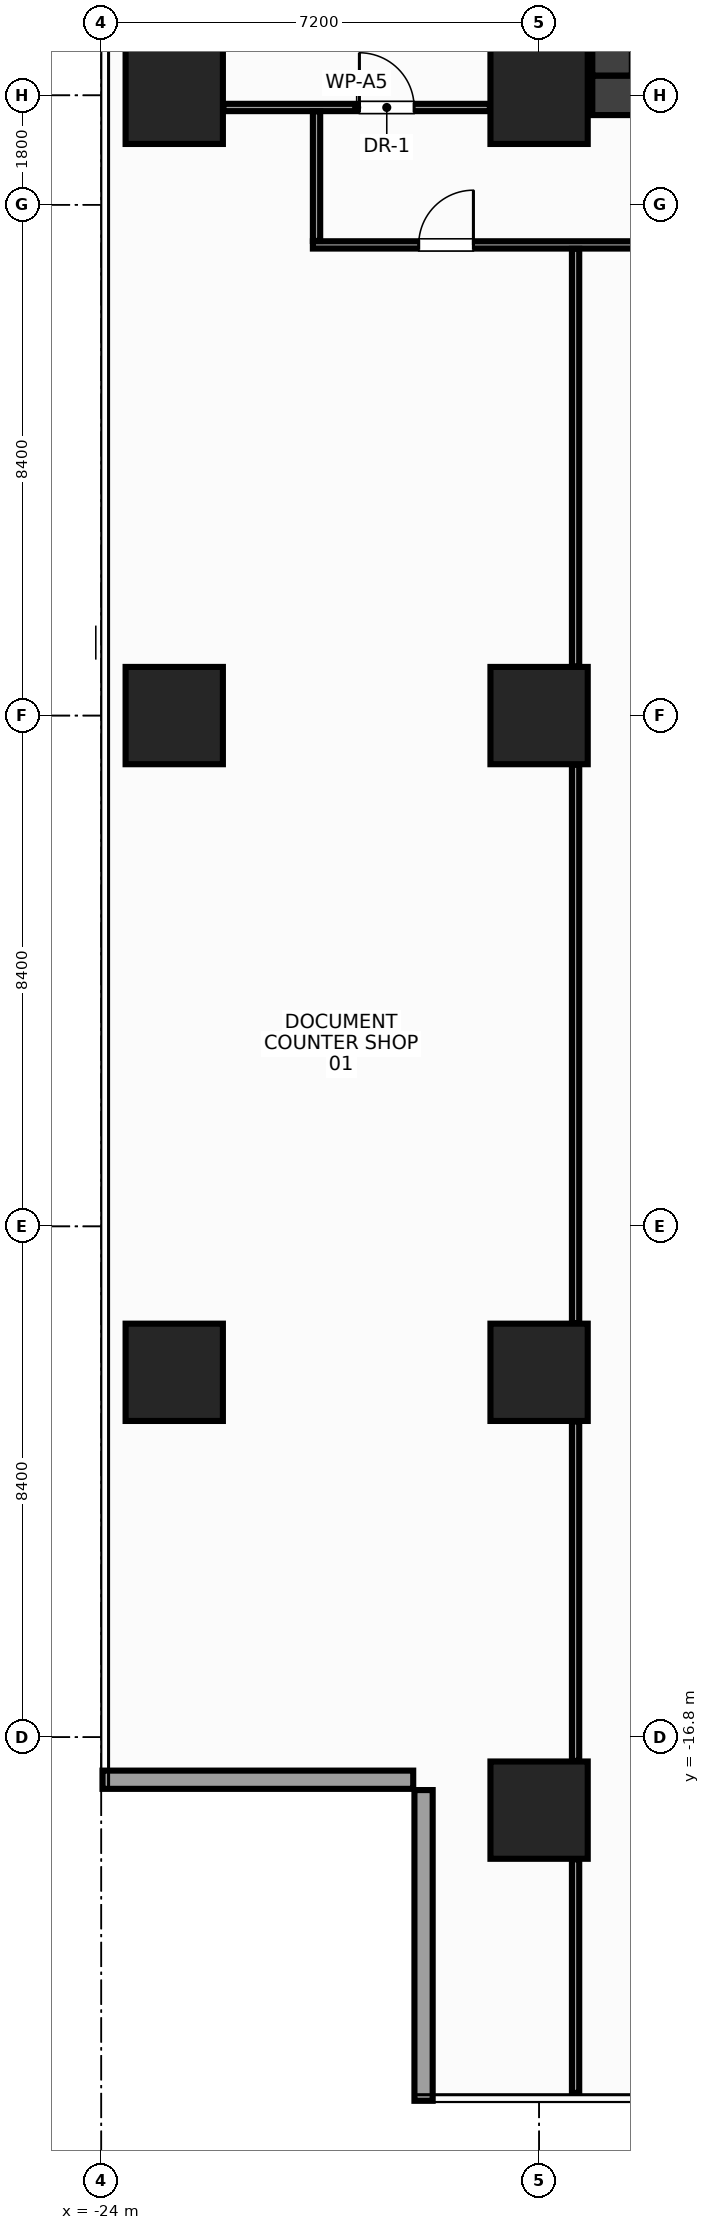
"""IFC4 building model, lengths in metres.
Left out: names, types, materials, properties, quantities, classifications, styles, units other than length and angle.
Written with IfcOpenShell. Run it as: python <this file> out.ifc"""

import sys

from ifc_helpers import new_model, si_unit, direction, frame, frame_2d, origin, origin_2d, place, context, subcontext, project, spatial, rectangle, extrude, source, transform, mapped, element, fill, save


model = new_model("IFC4")
c1 = context("Model", 3, precision=1e-05, world=origin(), true_north=direction((0.0, 1.0)))
c2 = subcontext(c1, "Body", "Model", "MODEL_VIEW")
j1 = project(units=[si_unit("LENGTHUNIT", "METRE"), si_unit("PLANEANGLEUNIT", "RADIAN")], contexts=[c1])
p1 = place(None, origin())
s1 = spatial("IfcSite", under=j1, at=p1, CompositionType="ELEMENT")
p2 = place(p1, origin())
s2 = spatial("IfcBuilding", under=s1, at=p2, CompositionType="ELEMENT")
p3 = place(p2, frame((0.0, 0.0, 142.4)))
s3 = spatial("IfcBuildingStorey", under=s2, at=p3, CompositionType="ELEMENT", Elevation=142.4)
m1 = source(origin(), c2, "Body", "SweptSolid", [
    extrude(rectangle(XDim=31.85, YDim=0.65, at=frame_2d((15.925, 0.0))), origin(), (0.0, 0.0, 1.0), 3.6),
])
p4 = place(p3, frame((-15.925, 10.2, 0.0), z_axis=(0.0, 0.0, 1.0), x_axis=(1.0, 0.0, 0.0)))
e1 = element("IfcWall", 1, at=p4, inside=s3, PredefinedType="SHEAR", context=c2, shape_type="MappedRepresentation", body=[
    mapped(m1, transform((0.0, 0.0, 0.0), x_axis=(1.0, 0.0, 0.0), y_axis=(0.0, 1.0, 0.0), z_axis=(0.0, 0.0, 1.0), scale=1.0)),
])
p5 = place(p4, frame((1.775, 0.0, 0.0)))
e2 = element("IfcOpeningElement", 2, at=p5, cuts=e1, PredefinedType="OPENING", context=c2, shape_type="SweptSolid", body=[
    extrude(rectangle(XDim=1.6, YDim=2.15, at=frame_2d((0.8, 1.075))), frame((0.0, 0.337, 0.0), z_axis=(0.0, -1.0, 0.0), x_axis=(1.0, 0.0, 0.0)), (0.0, 0.0, 1.0), 0.674),
])
p6 = place(p4, frame((28.475, 0.0, 0.0)))
e3 = element("IfcOpeningElement", 3, at=p6, cuts=e1, PredefinedType="OPENING", context=c2, shape_type="SweptSolid", body=[
    extrude(rectangle(XDim=1.6, YDim=2.15, at=frame_2d((0.8, 1.075))), frame((0.0, 0.337, 0.0), z_axis=(0.0, -1.0, 0.0), x_axis=(1.0, 0.0, 0.0)), (0.0, 0.0, 1.0), 0.674),
])
p7 = place(p4, frame((15.175, 0.0, 0.0)))
e4 = element("IfcOpeningElement", 4, at=p7, cuts=e1, PredefinedType="OPENING", context=c2, shape_type="SweptSolid", body=[
    extrude(rectangle(XDim=1.5, YDim=2.2, at=frame_2d((0.75, 1.1))), frame((0.0, 0.337, 0.0), z_axis=(0.0, -1.0, 0.0), x_axis=(1.0, 0.0, 0.0)), (0.0, 0.0, 1.0), 0.674),
])
m2 = source(origin(), c2, "Body", "SweptSolid", [
    extrude(rectangle(XDim=12.95, YDim=0.65, at=frame_2d((6.475, 0.0))), origin(), (0.0, 0.0, 1.0), 3.6),
])
p8 = place(p3, frame((-15.6, 10.525, 0.0), z_axis=(0.0, 0.0, 1.0), x_axis=(0.0, 1.0, 0.0)))
e5 = element("IfcWall", 5, at=p8, inside=s3, PredefinedType="SHEAR", context=c2, shape_type="MappedRepresentation", body=[
    mapped(m2, transform((0.0, 0.0, 0.0), x_axis=(1.0, 0.0, 0.0), y_axis=(0.0, 1.0, 0.0), z_axis=(0.0, 0.0, 1.0), scale=1.0)),
])
m3 = source(origin(), c2, "Body", "SweptSolid", [
    extrude(rectangle(XDim=1.6, YDim=1.6, at=origin_2d()), origin(), (0.0, 0.0, 1.0), 3.6),
])
for number, where, z_axis, x_axis in (
    (6, (-16.8, -18.0, 0.0), (0.0, 0.0, 1.0), (1.0, 0.0, 0.0)),
    (7, (-16.8, -10.8, 0.0), (0.0, 0.0, 1.0), (1.0, 0.0, 0.0)),
    (8, (-16.8, 0.0, 0.0), (0.0, 0.0, 1.0), (1.0, 0.0, 0.0)),
    (9, (-16.8, 10.2, 0.0), (0.0, 0.0, 1.0), (1.0, 0.0, 0.0)),
    (10, (-22.8, -10.8, 0.0), (0.0, 0.0, 1.0), (1.0, 0.0, 0.0)),
    (11, (-22.8, 0.0, 0.0), (0.0, 0.0, 1.0), (1.0, 0.0, 0.0)),
    (12, (-22.8, 10.2, 0.0), (0.0, 0.0, 1.0), (1.0, 0.0, 0.0)),
):
    element("IfcColumn", number, at=place(p3, frame(where, z_axis=z_axis, x_axis=x_axis)), inside=s3, PredefinedType="COLUMN", context=c2, shape_type="MappedRepresentation", body=[
        mapped(m3, transform((0.0, 0.0, 0.0), x_axis=(1.0, 0.0, 0.0), y_axis=(0.0, 1.0, 0.0), z_axis=(0.0, 0.0, 1.0), scale=1.0)),
    ])
m4 = source(origin(), c2, "Body", "SweptSolid", [
    extrude(rectangle(XDim=5.11, YDim=0.3, at=frame_2d((2.555, 0.0))), origin(), (0.0, 0.0, 1.0), 2.76),
])
p9 = place(p3, frame((-23.98, -17.5, 0.0), z_axis=(0.0, 0.0, 1.0), x_axis=(1.0, 0.0, 0.0)))
e13 = element("IfcWall", 13, at=p9, inside=s3, PredefinedType="STANDARD", context=c2, shape_type="MappedRepresentation", body=[
    mapped(m4, transform((0.0, 0.0, 0.0), x_axis=(1.0, 0.0, 0.0), y_axis=(0.0, 1.0, 0.0), z_axis=(0.0, 0.0, 1.0), scale=1.0)),
])
m5 = source(origin(), c2, "Body", "SweptSolid", [
    extrude(rectangle(XDim=5.11, YDim=0.3, at=frame_2d((2.555, 0.0))), origin(), (0.0, 0.0, 1.0), 2.76),
])
p10 = place(p3, frame((-18.7, -17.67, 0.0), z_axis=(0.0, 0.0, 1.0), x_axis=(0.0, -1.0, 0.0)))
e14 = element("IfcWall", 14, at=p10, inside=s3, PredefinedType="STANDARD", context=c2, shape_type="MappedRepresentation", body=[
    mapped(m5, transform((0.0, 0.0, 0.0), x_axis=(1.0, 0.0, 0.0), y_axis=(0.0, 1.0, 0.0), z_axis=(0.0, 0.0, 1.0), scale=1.0)),
])
m6 = source(origin(), c2, "Body", "SweptSolid", [
    extrude(rectangle(XDim=4.38, YDim=0.12, at=frame_2d((2.19, 0.0))), origin(), (0.0, 0.0, 1.0), 2.915),
])
p11 = place(p3, frame((-21.99, 10.0, 0.0), z_axis=(0.0, 0.0, 1.0), x_axis=(1.0, 0.0, 0.0)))
e15 = element("IfcWall", 15, at=p11, inside=s3, PredefinedType="PARTITIONING", context=c2, shape_type="MappedRepresentation", body=[
    mapped(m6, transform((0.0, 0.0, 0.0), x_axis=(1.0, 0.0, 0.0), y_axis=(0.0, 1.0, 0.0), z_axis=(0.0, 0.0, 1.0), scale=1.0)),
])
p12 = place(p11, frame((2.235, 0.0, 0.0)))
e16 = element("IfcOpeningElement", 16, at=p12, cuts=e15, PredefinedType="OPENING", context=c2, shape_type="SweptSolid", body=[
    extrude(rectangle(XDim=0.9, YDim=2.15, at=frame_2d((0.45, 1.075))), frame((0.0, 0.072, 0.0), z_axis=(0.0, -1.0, 0.0), x_axis=(1.0, 0.0, 0.0)), (0.0, 0.0, 1.0), 0.144),
])
m7 = source(origin(), c2, "Body", "SweptSolid", [
    extrude(rectangle(XDim=31.6, YDim=0.12, at=frame_2d((15.8, 0.0))), origin(), (0.0, 0.0, 1.0), 2.765),
])
p13 = place(p3, frame((-20.52, 7.74, 0.0), z_axis=(0.0, 0.0, 1.0), x_axis=(1.0, 0.0, 0.0)))
e17 = element("IfcWall", 17, at=p13, inside=s3, PredefinedType="PARTITIONING", context=c2, shape_type="MappedRepresentation", body=[
    mapped(m7, transform((0.0, 0.0, 0.0), x_axis=(1.0, 0.0, 0.0), y_axis=(0.0, 1.0, 0.0), z_axis=(0.0, 0.0, 1.0), scale=1.0)),
])
p14 = place(p13, frame((1.74, 0.0, 0.0)))
e18 = element("IfcOpeningElement", 18, at=p14, cuts=e17, PredefinedType="OPENING", context=c2, shape_type="SweptSolid", body=[
    extrude(rectangle(XDim=0.9, YDim=2.15, at=frame_2d((0.45, 1.075))), frame((0.0, 0.072, 0.0), z_axis=(0.0, -1.0, 0.0), x_axis=(1.0, 0.0, 0.0)), (0.0, 0.0, 1.0), 0.144),
])
p15 = place(p13, frame((30.28, 0.0, 0.0)))
e19 = element("IfcOpeningElement", 19, at=p15, cuts=e17, PredefinedType="OPENING", context=c2, shape_type="SweptSolid", body=[
    extrude(rectangle(XDim=0.9, YDim=2.15, at=frame_2d((0.45, 1.075))), frame((0.0, 0.072, 0.0), z_axis=(0.0, -1.0, 0.0), x_axis=(1.0, 0.0, 0.0)), (0.0, 0.0, 1.0), 0.144),
])
p16 = place(p13, frame((10.67, 0.0, 0.0)))
e20 = element("IfcOpeningElement", 20, at=p16, cuts=e17, PredefinedType="OPENING", context=c2, shape_type="SweptSolid", body=[
    extrude(rectangle(XDim=0.9, YDim=2.15, at=frame_2d((0.45, 1.075))), frame((0.0, 0.072, 0.0), z_axis=(0.0, -1.0, 0.0), x_axis=(1.0, 0.0, 0.0)), (0.0, 0.0, 1.0), 0.144),
])
p17 = place(p13, frame((23.47, 0.0, 0.0)))
e21 = element("IfcOpeningElement", 21, at=p17, cuts=e17, PredefinedType="OPENING", context=c2, shape_type="SweptSolid", body=[
    extrude(rectangle(XDim=0.9, YDim=2.15, at=frame_2d((0.45, 1.075))), frame((0.0, 0.072, 0.0), z_axis=(0.0, -1.0, 0.0), x_axis=(1.0, 0.0, 0.0)), (0.0, 0.0, 1.0), 0.144),
])
m8 = source(origin(), c2, "Body", "SweptSolid", [
    extrude(rectangle(XDim=2.13, YDim=0.12, at=frame_2d((1.065, 0.0))), origin(), (0.0, 0.0, 1.0), 3.38),
])
p18 = place(p3, frame((-20.46, 7.805, 0.0), z_axis=(0.0, 0.0, 1.0), x_axis=(0.0, 1.0, 0.0)))
e22 = element("IfcWall", 22, at=p18, inside=s3, PredefinedType="PARTITIONING", context=c2, shape_type="MappedRepresentation", body=[
    mapped(m8, transform((0.0, 0.0, 0.0), x_axis=(1.0, 0.0, 0.0), y_axis=(0.0, 1.0, 0.0), z_axis=(0.0, 0.0, 1.0), scale=1.0)),
])
m9 = source(origin(), c2, "Body", "SweptSolid", [
    extrude(rectangle(XDim=3.84, YDim=0.12, at=frame_2d((1.92, 0.0))), origin(), (0.0, 0.0, 1.0), 3.38),
])
p19 = place(p3, frame((-16.2, -22.65, 0.0), z_axis=(0.0, 0.0, 1.0), x_axis=(0.0, 1.0, 0.0)))
e23 = element("IfcWall", 23, at=p19, inside=s3, PredefinedType="PARTITIONING", context=c2, shape_type="MappedRepresentation", body=[
    mapped(m9, transform((0.0, 0.0, 0.0), x_axis=(1.0, 0.0, 0.0), y_axis=(0.0, 1.0, 0.0), z_axis=(0.0, 0.0, 1.0), scale=1.0)),
])
m10 = source(origin(), c2, "Body", "SweptSolid", [
    extrude(rectangle(XDim=5.58, YDim=0.12, at=frame_2d((2.79, 0.0))), origin(), (0.0, 0.0, 1.0), 3.38),
])
p20 = place(p3, frame((-16.2, -17.19, 0.0), z_axis=(0.0, 0.0, 1.0), x_axis=(0.0, 1.0, 0.0)))
e24 = element("IfcWall", 24, at=p20, inside=s3, PredefinedType="PARTITIONING", context=c2, shape_type="MappedRepresentation", body=[
    mapped(m10, transform((0.0, 0.0, 0.0), x_axis=(1.0, 0.0, 0.0), y_axis=(0.0, 1.0, 0.0), z_axis=(0.0, 0.0, 1.0), scale=1.0)),
])
m11 = source(origin(), c2, "Body", "SweptSolid", [
    extrude(rectangle(XDim=9.18, YDim=0.12, at=frame_2d((4.59, 0.0))), origin(), (0.0, 0.0, 1.0), 3.38),
])
p21 = place(p3, frame((-16.2, -9.99, 0.0), z_axis=(0.0, 0.0, 1.0), x_axis=(0.0, 1.0, 0.0)))
e25 = element("IfcWall", 25, at=p21, inside=s3, PredefinedType="PARTITIONING", context=c2, shape_type="MappedRepresentation", body=[
    mapped(m11, transform((0.0, 0.0, 0.0), x_axis=(1.0, 0.0, 0.0), y_axis=(0.0, 1.0, 0.0), z_axis=(0.0, 0.0, 1.0), scale=1.0)),
])
m12 = source(origin(), c2, "Body", "SweptSolid", [
    extrude(rectangle(XDim=6.865, YDim=0.12, at=frame_2d((3.433, 0.0))), origin(), (0.0, 0.0, 1.0), 2.665),
])
p22 = place(p3, frame((-16.2, 0.81, 0.0), z_axis=(0.0, 0.0, 1.0), x_axis=(0.0, 1.0, 0.0)))
e26 = element("IfcWall", 26, at=p22, inside=s3, PredefinedType="PARTITIONING", context=c2, shape_type="MappedRepresentation", body=[
    mapped(m12, transform((0.0, 0.0, 0.0), x_axis=(1.0, 0.0, 0.0), y_axis=(0.0, 1.0, 0.0), z_axis=(0.0, 0.0, 1.0), scale=1.0)),
])
m13 = source(origin(), c2, "Body", "SweptSolid", [
    extrude(rectangle(XDim=0.9, YDim=2.15, at=frame_2d((0.45, 1.075))), frame((0.0, 0.025, 0.0), z_axis=(0.0, -1.0, 0.0), x_axis=(1.0, 0.0, 0.0)), (0.0, 0.0, 1.0), 0.05),
])
p23 = place(p12, origin())
e27 = element("IfcDoor", 27, at=p23, inside=s3, OperationType="SINGLE_SWING_LEFT", PredefinedType="DOOR", context=c2, shape_type="MappedRepresentation", body=[
    mapped(m13, transform((0.0, 0.0, 0.0), x_axis=(1.0, 0.0, 0.0), y_axis=(0.0, 1.0, 0.0), z_axis=(0.0, 0.0, 1.0), scale=1.0)),
])
fill(e16, e27)
p24 = place(p14, origin())
e28 = element("IfcDoor", 28, at=p24, inside=s3, OperationType="SINGLE_SWING_RIGHT", PredefinedType="DOOR", context=c2, shape_type="MappedRepresentation", body=[
    mapped(m13, transform((0.0, 0.0, 0.0), x_axis=(1.0, 0.0, 0.0), y_axis=(0.0, 1.0, 0.0), z_axis=(0.0, 0.0, 1.0), scale=1.0)),
])
fill(e18, e28)
save(model, sys.argv[1])
